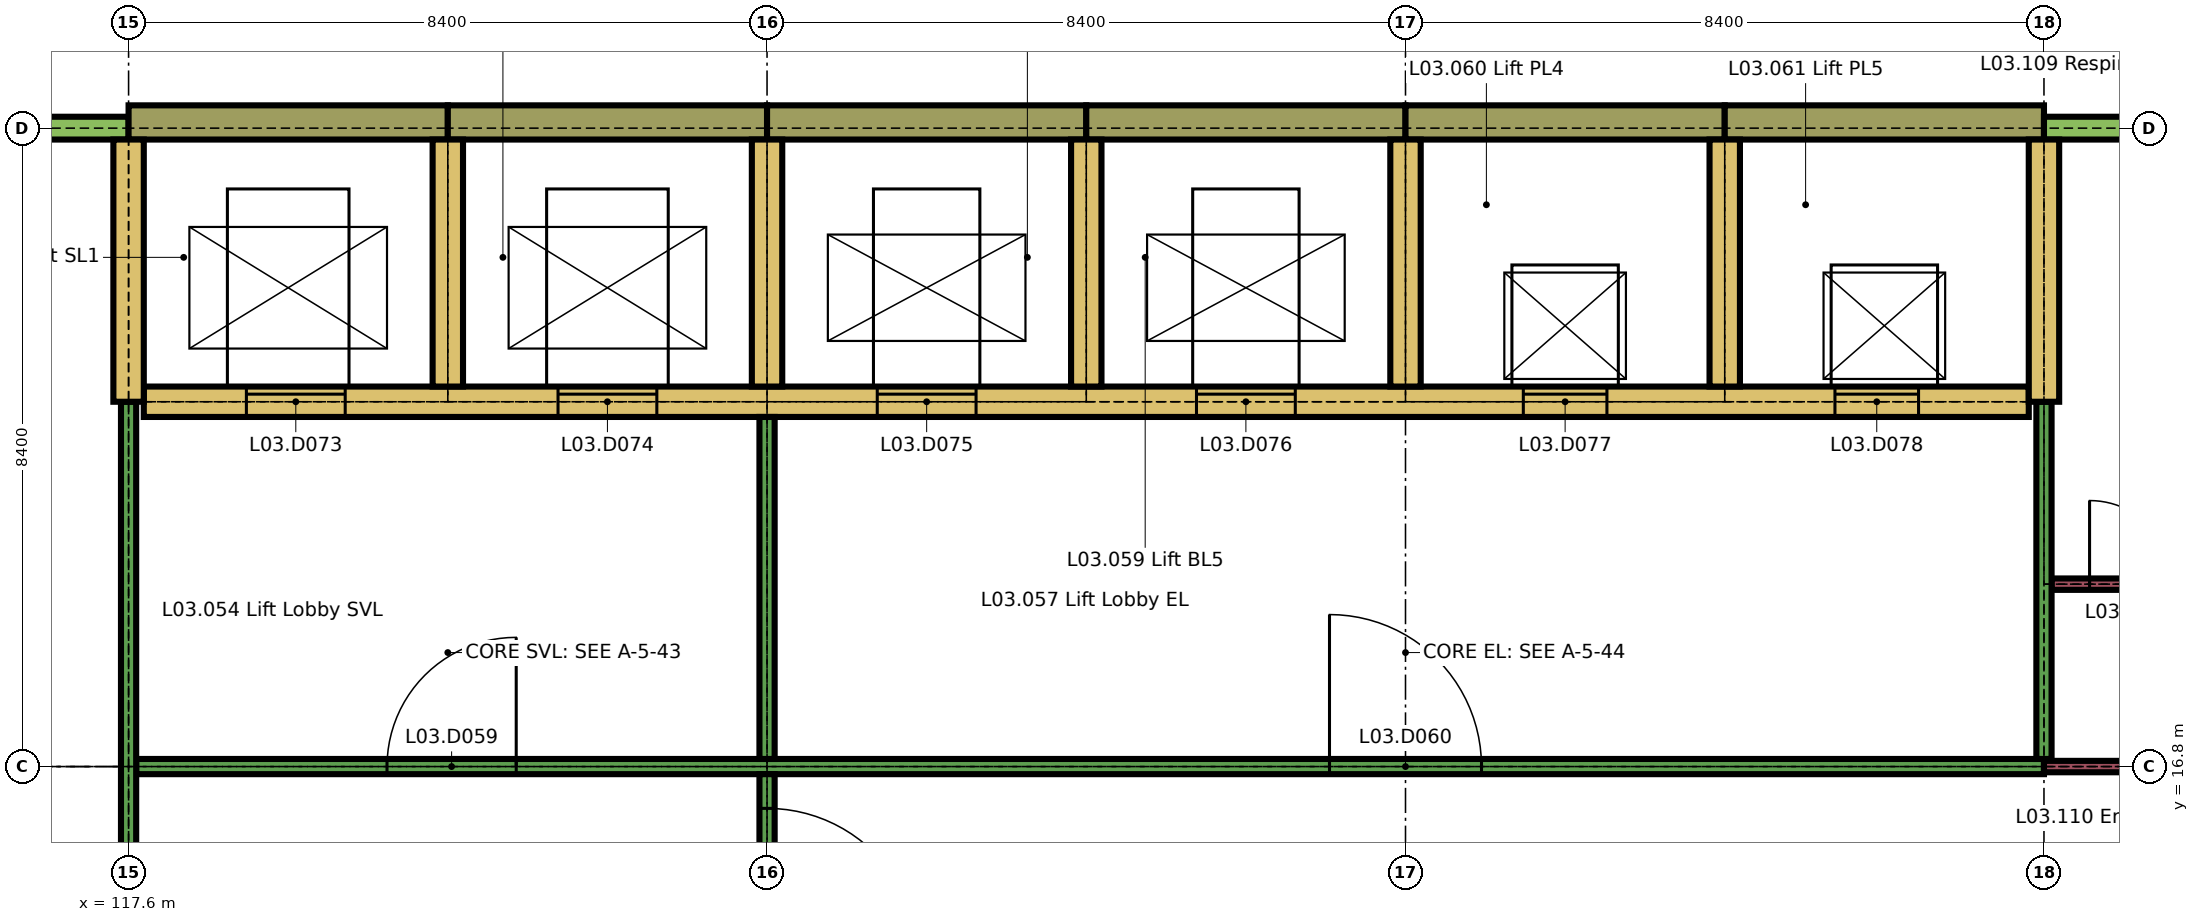
"""IFC4 building model, lengths in metres.
Left out: names, types, materials, properties, quantities, classifications, styles, units other than length and angle.
Written with IfcOpenShell. Run it as: python <this file> out.ifc"""

import sys

from ifc_helpers import new_model, si_unit, direction, frame, frame_2d, origin, place, context, subcontext, project, spatial, rectangle, extrude, element, fill, save


model = new_model("IFC4")
c1 = context("Model", 3, precision=1e-05, world=origin(), true_north=direction((0.0, 1.0)))
c2 = subcontext(c1, "Body", "Model", "MODEL_VIEW")
j1 = project(units=[si_unit("LENGTHUNIT", "METRE"), si_unit("PLANEANGLEUNIT", "RADIAN")], contexts=[c1])
p1 = place(None, origin())
s1 = spatial("IfcSite", under=j1, at=p1, CompositionType="ELEMENT")
p2 = place(p1, origin())
s2 = spatial("IfcBuilding", under=s1, at=p2, CompositionType="ELEMENT")
p3 = place(p2, frame((0.0, 0.0, 15.3)))
s3 = spatial("IfcBuildingStorey", under=s2, at=p3, CompositionType="ELEMENT", Elevation=15.3)
p4 = place(p3, frame((109.575, 25.2, 0.0), z_axis=(0.0, 0.0, 1.0), x_axis=(1.0, 0.0, 0.0)))
e1 = element("IfcWall", 1, at=p4, inside=s3, PredefinedType="SOLIDWALL", context=c2, shape_type="SweptSolid", body=[
    extrude(rectangle(XDim=8.025, YDim=0.3, at=frame_2d((4.013, 0.0))), origin(), (0.0, 0.0, 1.0), 2.96),
])
p5 = place(p4, frame((0.675, 0.0, 0.6)))
e2 = element("IfcOpeningElement", 2, at=p5, cuts=e1, PredefinedType="OPENING", context=c2, shape_type="SweptSolid", body=[
    extrude(rectangle(XDim=2.1, YDim=1.8, at=frame_2d((1.05, 0.9))), frame((0.0, 0.16, 0.0), z_axis=(0.0, -1.0, 0.0), x_axis=(1.0, 0.0, 0.0)), (0.0, 0.0, 1.0), 0.32),
])
p6 = place(p4, frame((3.113, 0.0, 0.0)))
e3 = element("IfcOpeningElement", 3, at=p6, cuts=e1, PredefinedType="OPENING", context=c2, shape_type="SweptSolid", body=[
    extrude(rectangle(XDim=1.8, YDim=2.4, at=frame_2d((0.9, 1.2))), frame((0.0, 0.16, 0.0), z_axis=(0.0, -1.0, 0.0), x_axis=(1.0, 0.0, 0.0)), (0.0, 0.0, 1.0), 0.32),
])
for number, where, z_axis, x_axis in (
    (4, (117.6, 25.275, 0.0), (0.0, 0.0, 1.0), (1.0, 0.0, 0.0)),
    (5, (121.8, 25.275, 0.0), (0.0, 0.0, 1.0), (1.0, 0.0, 0.0)),
    (6, (126.0, 25.275, 0.0), (0.0, 0.0, 1.0), (1.0, 0.0, 0.0)),
    (7, (130.2, 25.275, 0.0), (0.0, 0.0, 1.0), (1.0, 0.0, 0.0)),
):
    element("IfcWall", number, at=place(p3, frame(where, z_axis=z_axis, x_axis=x_axis)), inside=s3, PredefinedType="SOLIDWALL", context=c2, shape_type="SweptSolid", body=[
        extrude(rectangle(XDim=4.2, YDim=0.45, at=frame_2d((2.1, 0.0))), origin(), (0.0, 0.0, 1.0), 3.26),
    ])
p7 = place(p3, frame((134.4, 25.275, 0.0), z_axis=(0.0, 0.0, 1.0), x_axis=(1.0, 0.0, 0.0)))
e8 = element("IfcWall", 8, at=p7, inside=s3, PredefinedType="SOLIDWALL", context=c2, shape_type="SweptSolid", body=[
    extrude(rectangle(XDim=4.2, YDim=0.45, at=frame_2d((2.1, 0.0))), origin(), (0.0, 0.0, 1.0), 3.26),
])
p8 = place(p3, frame((138.6, 25.275, 0.0), z_axis=(0.0, 0.0, 1.0), x_axis=(1.0, 0.0, 0.0)))
e9 = element("IfcWall", 9, at=p8, inside=s3, PredefinedType="SOLIDWALL", context=c2, shape_type="SweptSolid", body=[
    extrude(rectangle(XDim=4.2, YDim=0.45, at=frame_2d((2.1, 0.0))), origin(), (0.0, 0.0, 1.0), 3.26),
])
p9 = place(p3, frame((142.8, 25.2, 0.0), z_axis=(0.0, 0.0, 1.0), x_axis=(1.0, 0.0, 0.0)))
e10 = element("IfcWall", 10, at=p9, inside=s3, PredefinedType="SOLIDWALL", context=c2, shape_type="SweptSolid", body=[
    extrude(rectangle(XDim=4.2, YDim=0.3, at=frame_2d((2.1, 0.0))), origin(), (0.0, 0.0, 1.0), 2.96),
])
p10 = place(p9, frame((1.05, 0.0, 0.9)))
e11 = element("IfcOpeningElement", 11, at=p10, cuts=e10, PredefinedType="OPENING", context=c2, shape_type="SweptSolid", body=[
    extrude(rectangle(XDim=2.1, YDim=1.5, at=frame_2d((1.05, 0.75))), frame((0.0, 0.16, 0.0), z_axis=(0.0, -1.0, 0.0), x_axis=(1.0, 0.0, 0.0)), (0.0, 0.0, 1.0), 0.32),
])
p11 = place(p3, frame((117.7, 16.8, 0.0), z_axis=(0.0, 0.0, 1.0), x_axis=(1.0, 0.0, 0.0)))
e12 = element("IfcWall", 12, at=p11, inside=s3, PredefinedType="PARTITIONING", context=c2, shape_type="SweptSolid", body=[
    extrude(rectangle(XDim=25.1, YDim=0.2, at=frame_2d((12.55, 0.0))), origin(), (0.0, 0.0, 1.0), 3.26),
])
p12 = place(p11, frame((3.3, 0.0, 0.0)))
e13 = element("IfcOpeningElement", 13, at=p12, cuts=e12, PredefinedType="OPENING", context=c2, shape_type="SweptSolid", body=[
    extrude(rectangle(XDim=1.7, YDim=2.4, at=frame_2d((0.85, 1.2))), frame((0.0, 0.11, 0.0), z_axis=(0.0, -1.0, 0.0), x_axis=(1.0, 0.0, 0.0)), (0.0, 0.0, 1.0), 0.22),
])
p13 = place(p11, frame((15.7, 0.0, 0.0)))
e14 = element("IfcOpeningElement", 14, at=p13, cuts=e12, PredefinedType="OPENING", context=c2, shape_type="SweptSolid", body=[
    extrude(rectangle(XDim=2.0, YDim=2.4, at=frame_2d((1.0, 1.2))), frame((0.0, 0.11, 0.0), z_axis=(0.0, -1.0, 0.0), x_axis=(1.0, 0.0, 0.0)), (0.0, 0.0, 1.0), 0.22),
])
p14 = place(p3, frame((142.8, 16.8, 0.0), z_axis=(0.0, 0.0, 1.0), x_axis=(1.0, 0.0, 0.0)))
e15 = element("IfcWall", 15, at=p14, inside=s3, PredefinedType="PARTITIONING", context=c2, shape_type="SweptSolid", body=[
    extrude(rectangle(XDim=4.275, YDim=0.15, at=frame_2d((2.137, 0.0))), origin(), (0.0, 0.0, 1.0), 3.26),
])
p15 = place(p14, frame((2.45, 0.0, 0.0)))
e16 = element("IfcOpeningElement", 16, at=p15, cuts=e15, PredefinedType="OPENING", context=c2, shape_type="SweptSolid", body=[
    extrude(rectangle(XDim=1.5, YDim=2.4, at=frame_2d((0.75, 1.2))), frame((0.0, 0.085, 0.0), z_axis=(0.0, -1.0, 0.0), x_axis=(1.0, 0.0, 0.0)), (0.0, 0.0, 1.0), 0.17),
])
p16 = place(p3, frame((142.9, 19.2, 0.0), z_axis=(0.0, 0.0, 1.0), x_axis=(1.0, 0.0, 0.0)))
e17 = element("IfcWall", 17, at=p16, inside=s3, PredefinedType="PARTITIONING", context=c2, shape_type="SweptSolid", body=[
    extrude(rectangle(XDim=2.175, YDim=0.15, at=frame_2d((1.087, 0.0))), origin(), (0.0, 0.0, 1.0), 3.26),
])
p17 = place(p16, frame((0.5, 0.0, 0.0)))
e18 = element("IfcOpeningElement", 18, at=p17, cuts=e17, PredefinedType="OPENING", context=c2, shape_type="SweptSolid", body=[
    extrude(rectangle(XDim=1.1, YDim=2.1, at=frame_2d((0.55, 1.05))), frame((0.0, 0.085, 0.0), z_axis=(0.0, -1.0, 0.0), x_axis=(1.0, 0.0, 0.0)), (0.0, 0.0, 1.0), 0.17),
])
p18 = place(p3, frame((117.8, 21.6, 0.0), z_axis=(0.0, 0.0, 1.0), x_axis=(1.0, 0.0, 0.0)))
e19 = element("IfcWall", 19, at=p18, inside=s3, PredefinedType="SHEAR", context=c2, shape_type="SweptSolid", body=[
    extrude(rectangle(XDim=24.8, YDim=0.4, at=frame_2d((12.4, 0.0))), origin(), (0.0, 0.0, 1.0), 3.26),
])
p19 = place(p18, frame((1.35, 0.0, 0.0)))
e20 = element("IfcOpeningElement", 20, at=p19, cuts=e19, PredefinedType="OPENING", context=c2, shape_type="SweptSolid", body=[
    extrude(rectangle(XDim=1.3, YDim=2.1, at=frame_2d((0.65, 1.05))), frame((0.0, 0.21, 0.0), z_axis=(0.0, -1.0, 0.0), x_axis=(1.0, 0.0, 0.0)), (0.0, 0.0, 1.0), 0.42),
])
p20 = place(p18, frame((5.45, 0.0, 0.0)))
e21 = element("IfcOpeningElement", 21, at=p20, cuts=e19, PredefinedType="OPENING", context=c2, shape_type="SweptSolid", body=[
    extrude(rectangle(XDim=1.3, YDim=2.1, at=frame_2d((0.65, 1.05))), frame((0.0, 0.21, 0.0), z_axis=(0.0, -1.0, 0.0), x_axis=(1.0, 0.0, 0.0)), (0.0, 0.0, 1.0), 0.42),
])
p21 = place(p18, frame((9.65, 0.0, 0.0)))
e22 = element("IfcOpeningElement", 22, at=p21, cuts=e19, PredefinedType="OPENING", context=c2, shape_type="SweptSolid", body=[
    extrude(rectangle(XDim=1.3, YDim=2.1, at=frame_2d((0.65, 1.05))), frame((0.0, 0.21, 0.0), z_axis=(0.0, -1.0, 0.0), x_axis=(1.0, 0.0, 0.0)), (0.0, 0.0, 1.0), 0.42),
])
p22 = place(p18, frame((13.85, 0.0, 0.0)))
e23 = element("IfcOpeningElement", 23, at=p22, cuts=e19, PredefinedType="OPENING", context=c2, shape_type="SweptSolid", body=[
    extrude(rectangle(XDim=1.3, YDim=2.1, at=frame_2d((0.65, 1.05))), frame((0.0, 0.21, 0.0), z_axis=(0.0, -1.0, 0.0), x_axis=(1.0, 0.0, 0.0)), (0.0, 0.0, 1.0), 0.42),
])
p23 = place(p18, frame((18.15, 0.0, 0.0)))
e24 = element("IfcOpeningElement", 24, at=p23, cuts=e19, PredefinedType="OPENING", context=c2, shape_type="SweptSolid", body=[
    extrude(rectangle(XDim=1.1, YDim=2.1, at=frame_2d((0.55, 1.05))), frame((0.0, 0.21, 0.0), z_axis=(0.0, -1.0, 0.0), x_axis=(1.0, 0.0, 0.0)), (0.0, 0.0, 1.0), 0.42),
])
p24 = place(p18, frame((22.25, 0.0, 0.0)))
e25 = element("IfcOpeningElement", 25, at=p24, cuts=e19, PredefinedType="OPENING", context=c2, shape_type="SweptSolid", body=[
    extrude(rectangle(XDim=1.1, YDim=2.1, at=frame_2d((0.55, 1.05))), frame((0.0, 0.21, 0.0), z_axis=(0.0, -1.0, 0.0), x_axis=(1.0, 0.0, 0.0)), (0.0, 0.0, 1.0), 0.42),
])
p25 = place(p3, frame((117.6, 8.775, 0.0), z_axis=(0.0, 0.0, 1.0), x_axis=(0.0, 1.0, 0.0)))
e26 = element("IfcWall", 26, at=p25, inside=s3, PredefinedType="PARTITIONING", context=c2, shape_type="SweptSolid", body=[
    extrude(rectangle(XDim=12.825, YDim=0.2, at=frame_2d((6.413, 0.0))), origin(), (0.0, 0.0, 1.0), 3.26),
])
p26 = place(p25, frame((3.163, 0.0, 0.0)))
e27 = element("IfcOpeningElement", 27, at=p26, cuts=e26, PredefinedType="OPENING", context=c2, shape_type="SweptSolid", body=[
    extrude(rectangle(XDim=1.7, YDim=2.4, at=frame_2d((0.85, 1.2))), frame((0.0, 0.11, 0.0), z_axis=(0.0, -1.0, 0.0), x_axis=(1.0, 0.0, 0.0)), (0.0, 0.0, 1.0), 0.22),
])
p27 = place(p3, frame((117.6, 21.6, 0.0), z_axis=(0.0, 0.0, 1.0), x_axis=(0.0, 1.0, 0.0)))
e28 = element("IfcWall", 28, at=p27, inside=s3, PredefinedType="SHEAR", context=c2, shape_type="SweptSolid", body=[
    extrude(rectangle(XDim=3.45, YDim=0.4, at=frame_2d((1.725, 0.0))), origin(), (0.0, 0.0, 1.0), 3.26),
])
p28 = place(p3, frame((121.8, 21.8, 0.0), z_axis=(0.0, 0.0, 1.0), x_axis=(0.0, 1.0, 0.0)))
e29 = element("IfcWall", 29, at=p28, inside=s3, PredefinedType="SHEAR", context=c2, shape_type="SweptSolid", body=[
    extrude(rectangle(XDim=3.25, YDim=0.4, at=frame_2d((1.625, 0.0))), origin(), (0.0, 0.0, 1.0), 3.26),
])
p29 = place(p3, frame((126.0, 8.775, 0.0), z_axis=(0.0, 0.0, 1.0), x_axis=(0.0, 1.0, 0.0)))
e30 = element("IfcWall", 30, at=p29, inside=s3, PredefinedType="PARTITIONING", context=c2, shape_type="SweptSolid", body=[
    extrude(rectangle(XDim=7.925, YDim=0.2, at=frame_2d((3.962, 0.0))), origin(), (0.0, 0.0, 1.0), 3.26),
])
p30 = place(p29, frame((0.312, 0.0, 0.0)))
e31 = element("IfcOpeningElement", 31, at=p30, cuts=e30, PredefinedType="OPENING", context=c2, shape_type="SweptSolid", body=[
    extrude(rectangle(XDim=2.0, YDim=2.4, at=frame_2d((1.0, 1.2))), frame((0.0, 0.11, 0.0), z_axis=(0.0, -1.0, 0.0), x_axis=(1.0, 0.0, 0.0)), (0.0, 0.0, 1.0), 0.22),
])
p31 = place(p29, frame((5.475, 0.0, 0.0)))
e32 = element("IfcOpeningElement", 32, at=p31, cuts=e30, PredefinedType="OPENING", context=c2, shape_type="SweptSolid", body=[
    extrude(rectangle(XDim=2.0, YDim=2.4, at=frame_2d((1.0, 1.2))), frame((0.0, 0.11, 0.0), z_axis=(0.0, -1.0, 0.0), x_axis=(1.0, 0.0, 0.0)), (0.0, 0.0, 1.0), 0.22),
])
p32 = place(p3, frame((126.0, 16.9, 0.0), z_axis=(0.0, 0.0, 1.0), x_axis=(0.0, 1.0, 0.0)))
e33 = element("IfcWall", 33, at=p32, inside=s3, PredefinedType="PARTITIONING", context=c2, shape_type="SweptSolid", body=[
    extrude(rectangle(XDim=4.5, YDim=0.2, at=frame_2d((2.25, 0.0))), origin(), (0.0, 0.0, 1.0), 3.26),
])
for number, where, z_axis, x_axis in (
    (34, (126.0, 21.8, 0.0), (0.0, 0.0, 1.0), (0.0, 1.0, 0.0)),
    (35, (130.2, 21.8, 0.0), (0.0, 0.0, 1.0), (0.0, 1.0, 0.0)),
    (36, (134.4, 21.8, 0.0), (0.0, 0.0, 1.0), (0.0, 1.0, 0.0)),
    (37, (138.6, 21.8, 0.0), (0.0, 0.0, 1.0), (0.0, 1.0, 0.0)),
):
    element("IfcWall", number, at=place(p3, frame(where, z_axis=z_axis, x_axis=x_axis)), inside=s3, PredefinedType="SHEAR", context=c2, shape_type="SweptSolid", body=[
        extrude(rectangle(XDim=3.25, YDim=0.4, at=frame_2d((1.625, 0.0))), origin(), (0.0, 0.0, 1.0), 3.26),
    ])
p33 = place(p3, frame((142.8, 16.9, 0.0), z_axis=(0.0, 0.0, 1.0), x_axis=(0.0, 1.0, 0.0)))
e38 = element("IfcWall", 38, at=p33, inside=s3, PredefinedType="PARTITIONING", context=c2, shape_type="SweptSolid", body=[
    extrude(rectangle(XDim=4.7, YDim=0.2, at=frame_2d((2.35, 0.0))), origin(), (0.0, 0.0, 1.0), 3.26),
])
p34 = place(p3, frame((142.8, 21.6, 0.0), z_axis=(0.0, 0.0, 1.0), x_axis=(0.0, 1.0, 0.0)))
e39 = element("IfcWall", 39, at=p34, inside=s3, PredefinedType="SHEAR", context=c2, shape_type="SweptSolid", body=[
    extrude(rectangle(XDim=3.45, YDim=0.4, at=frame_2d((1.725, 0.0))), origin(), (0.0, 0.0, 1.0), 3.26),
])
p35 = place(p12, origin())
e40 = element("IfcDoor", 40, at=p35, inside=s3, OperationType="SINGLE_SWING_LEFT", PredefinedType="DOOR", context=c2, shape_type="SweptSolid", body=[
    extrude(rectangle(XDim=1.7, YDim=2.4, at=frame_2d((0.85, 1.2))), frame((0.0, 0.025, 0.0), z_axis=(0.0, -1.0, 0.0), x_axis=(1.0, 0.0, 0.0)), (0.0, 0.0, 1.0), 0.05),
])
fill(e13, e40)
p36 = place(p13, origin())
e41 = element("IfcDoor", 41, at=p36, inside=s3, OperationType="SINGLE_SWING_RIGHT", PredefinedType="DOOR", context=c2, shape_type="SweptSolid", body=[
    extrude(rectangle(XDim=2.0, YDim=2.4, at=frame_2d((1.0, 1.2))), frame((0.0, 0.03, 0.0), z_axis=(0.0, -1.0, 0.0), x_axis=(1.0, 0.0, 0.0)), (0.0, 0.0, 1.0), 0.06),
])
fill(e14, e41)
p37 = place(p17, origin())
e42 = element("IfcDoor", 42, at=p37, inside=s3, OperationType="SINGLE_SWING_RIGHT", PredefinedType="DOOR", context=c2, shape_type="SweptSolid", body=[
    extrude(rectangle(XDim=1.1, YDim=2.1, at=frame_2d((0.55, 1.05))), frame((0.0, 0.025, 0.0), z_axis=(0.0, -1.0, 0.0), x_axis=(1.0, 0.0, 0.0)), (0.0, 0.0, 1.0), 0.05),
])
fill(e18, e42)
p38 = place(p19, origin())
e43 = element("IfcDoor", 43, at=p38, inside=s3, OperationType="SLIDING_TO_LEFT", PredefinedType="DOOR", context=c2, shape_type="SweptSolid", body=[
    extrude(rectangle(XDim=1.3, YDim=2.1, at=frame_2d((0.65, 1.05))), frame((0.0, 0.025, 0.0), z_axis=(0.0, -1.0, 0.0), x_axis=(1.0, 0.0, 0.0)), (0.0, 0.0, 1.0), 0.05),
])
fill(e20, e43)
p39 = place(p20, origin())
e44 = element("IfcDoor", 44, at=p39, inside=s3, OperationType="SLIDING_TO_LEFT", PredefinedType="DOOR", context=c2, shape_type="SweptSolid", body=[
    extrude(rectangle(XDim=1.3, YDim=2.1, at=frame_2d((0.65, 1.05))), frame((0.0, 0.025, 0.0), z_axis=(0.0, -1.0, 0.0), x_axis=(1.0, 0.0, 0.0)), (0.0, 0.0, 1.0), 0.05),
])
fill(e21, e44)
p40 = place(p21, origin())
e45 = element("IfcDoor", 45, at=p40, inside=s3, OperationType="SLIDING_TO_LEFT", PredefinedType="DOOR", context=c2, shape_type="SweptSolid", body=[
    extrude(rectangle(XDim=1.3, YDim=2.1, at=frame_2d((0.65, 1.05))), frame((0.0, 0.025, 0.0), z_axis=(0.0, -1.0, 0.0), x_axis=(1.0, 0.0, 0.0)), (0.0, 0.0, 1.0), 0.05),
])
fill(e22, e45)
p41 = place(p22, origin())
e46 = element("IfcDoor", 46, at=p41, inside=s3, OperationType="SLIDING_TO_LEFT", PredefinedType="DOOR", context=c2, shape_type="SweptSolid", body=[
    extrude(rectangle(XDim=1.3, YDim=2.1, at=frame_2d((0.65, 1.05))), frame((0.0, 0.025, 0.0), z_axis=(0.0, -1.0, 0.0), x_axis=(1.0, 0.0, 0.0)), (0.0, 0.0, 1.0), 0.05),
])
fill(e23, e46)
p42 = place(p23, origin())
e47 = element("IfcDoor", 47, at=p42, inside=s3, OperationType="SLIDING_TO_LEFT", PredefinedType="DOOR", context=c2, shape_type="SweptSolid", body=[
    extrude(rectangle(XDim=1.1, YDim=2.1, at=frame_2d((0.55, 1.05))), frame((0.0, 0.025, 0.0), z_axis=(0.0, -1.0, 0.0), x_axis=(1.0, 0.0, 0.0)), (0.0, 0.0, 1.0), 0.05),
])
fill(e24, e47)
p43 = place(p24, origin())
e48 = element("IfcDoor", 48, at=p43, inside=s3, OperationType="SLIDING_TO_LEFT", PredefinedType="DOOR", context=c2, shape_type="SweptSolid", body=[
    extrude(rectangle(XDim=1.1, YDim=2.1, at=frame_2d((0.55, 1.05))), frame((0.0, 0.025, 0.0), z_axis=(0.0, -1.0, 0.0), x_axis=(1.0, 0.0, 0.0)), (0.0, 0.0, 1.0), 0.05),
])
fill(e25, e48)
p44 = place(p31, origin())
e49 = element("IfcDoor", 49, at=p44, inside=s3, OperationType="SINGLE_SWING_LEFT", PredefinedType="DOOR", context=c2, shape_type="SweptSolid", body=[
    extrude(rectangle(XDim=2.0, YDim=2.4, at=frame_2d((1.0, 1.2))), frame((0.0, 0.03, 0.0), z_axis=(0.0, -1.0, 0.0), x_axis=(1.0, 0.0, 0.0)), (0.0, 0.0, 1.0), 0.06),
])
fill(e32, e49)
save(model, sys.argv[1])
